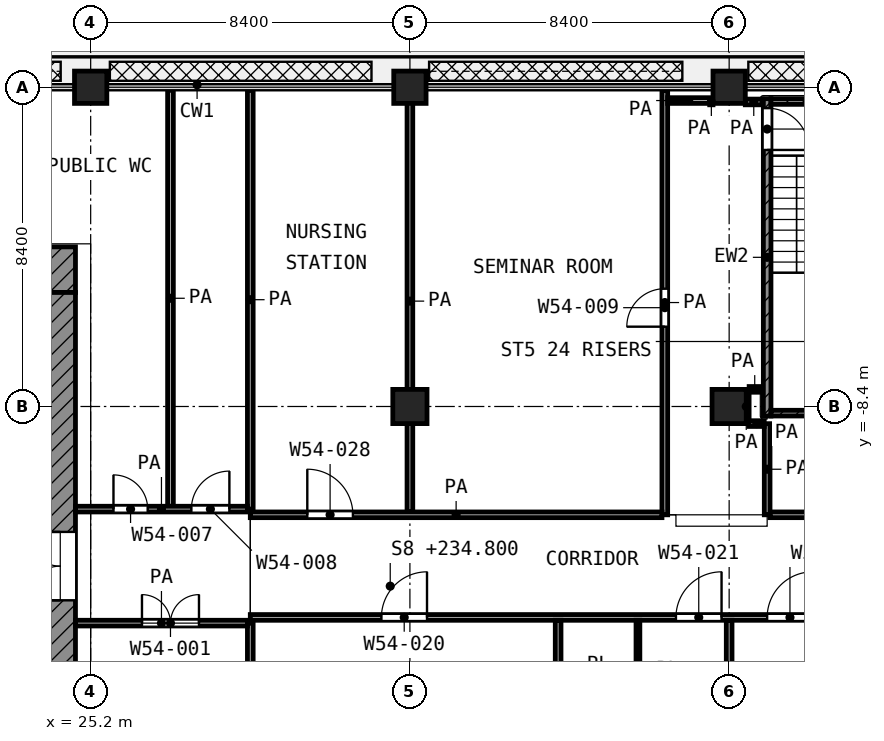
"""IFC4 building model, lengths in metres.
Left out: names, types, materials, properties, quantities, classifications, styles, units other than length and angle.
Written with IfcOpenShell. Run it as: python <this file> out.ifc"""

import sys

from ifc_helpers import new_model, si_unit, direction, frame, frame_2d, origin, origin_2d, place, context, subcontext, project, spatial, rectangle, extrude, element, fill, save


model = new_model("IFC4")
c1 = context("Model", 3, precision=1e-05, world=origin(), true_north=direction((0.0, 1.0)))
c2 = subcontext(c1, "Body", "Model", "MODEL_VIEW")
j1 = project(units=[si_unit("LENGTHUNIT", "METRE"), si_unit("PLANEANGLEUNIT", "RADIAN")], contexts=[c1])
p1 = place(None, origin())
s1 = spatial("IfcSite", under=j1, at=p1, CompositionType="ELEMENT")
p2 = place(p1, origin())
s2 = spatial("IfcBuilding", under=s1, at=p2, CompositionType="ELEMENT")
p3 = place(p2, frame((0.0, 0.0, 234.8)))
s3 = spatial("IfcBuildingStorey", under=s2, at=p3, CompositionType="ELEMENT", Elevation=234.8)
for number, where, z_axis, x_axis in (
    (1, (25.2, 0.0, 0.0), (0.0, 0.0, 1.0), (1.0, 0.0, 0.0)),
    (2, (33.6, 0.0, 0.0), (0.0, 0.0, 1.0), (1.0, 0.0, 0.0)),
    (3, (42.0, 0.0, 0.0), (0.0, 0.0, 1.0), (1.0, 0.0, 0.0)),
):
    element("IfcColumn", number, at=place(p3, frame(where, z_axis=z_axis, x_axis=x_axis)), inside=s3, PredefinedType="COLUMN", context=c2, shape_type="SweptSolid", body=[
        extrude(rectangle(XDim=0.85, YDim=0.85, at=origin_2d()), origin(), (0.0, 0.0, 1.0), 4.2),
    ])
for number, where, z_axis, x_axis in (
    (4, (33.6, -8.4, 0.0), (0.0, 0.0, 1.0), (1.0, 0.0, 0.0)),
    (5, (42.0, -8.4, 0.0), (0.0, 0.0, 1.0), (1.0, 0.0, 0.0)),
):
    element("IfcColumn", number, at=place(p3, frame(where, z_axis=z_axis, x_axis=x_axis)), inside=s3, PredefinedType="COLUMN", context=c2, shape_type="SweptSolid", body=[
        extrude(rectangle(XDim=0.9, YDim=0.9, at=origin_2d()), origin(), (0.0, 0.0, 1.0), 4.2),
    ])
p4 = place(p3, frame((4.2, -4.8, 0.0), z_axis=(0.0, 0.0, 1.0), x_axis=(1.0, 0.0, 0.0)))
e6 = element("IfcWall", 6, at=p4, inside=s3, PredefinedType="SHEAR", context=c2, shape_type="SweptSolid", body=[
    extrude(rectangle(XDim=20.6, YDim=1.2, at=frame_2d((10.3, 0.0))), origin(), (0.0, 0.0, 1.0), 3.6),
])
p5 = place(p4, frame((1.95, 0.0, 0.0)))
e7 = element("IfcOpeningElement", 7, at=p5, cuts=e6, PredefinedType="OPENING", context=c2, shape_type="SweptSolid", body=[
    extrude(rectangle(XDim=1.1, YDim=2.1, at=frame_2d((0.55, 1.05))), frame((0.0, 0.61, 0.0), z_axis=(0.0, -1.0, 0.0), x_axis=(1.0, 0.0, 0.0)), (0.0, 0.0, 1.0), 1.22),
])
p6 = place(p4, frame((17.95, 0.0, 0.0)))
e8 = element("IfcOpeningElement", 8, at=p6, cuts=e6, PredefinedType="OPENING", context=c2, shape_type="SweptSolid", body=[
    extrude(rectangle(XDim=1.1, YDim=2.1, at=frame_2d((0.55, 1.05))), frame((0.0, 0.61, 0.0), z_axis=(0.0, -1.0, 0.0), x_axis=(1.0, 0.0, 0.0)), (0.0, 0.0, 1.0), 1.22),
])
p7 = place(p3, frame((24.4, -24.0, 0.0), z_axis=(0.0, 0.0, 1.0), x_axis=(0.0, 1.0, 0.0)))
e9 = element("IfcWall", 9, at=p7, inside=s3, PredefinedType="SHEAR", context=c2, shape_type="SweptSolid", body=[
    extrude(rectangle(XDim=18.6, YDim=0.8, at=frame_2d((9.3, 0.0))), origin(), (0.0, 0.0, 1.0), 3.6),
])
p8 = place(p7, frame((10.5, 0.0, 0.0)))
e10 = element("IfcOpeningElement", 10, at=p8, cuts=e9, PredefinedType="OPENING", context=c2, shape_type="SweptSolid", body=[
    extrude(rectangle(XDim=1.8, YDim=2.1, at=frame_2d((0.9, 1.05))), frame((0.0, 0.41, 0.0), z_axis=(0.0, -1.0, 0.0), x_axis=(1.0, 0.0, 0.0)), (0.0, 0.0, 1.0), 0.82),
])
p9 = place(p3, frame((43.0, -8.65, 0.0), z_axis=(0.0, 0.0, 1.0), x_axis=(0.0, 1.0, 0.0)))
e11 = element("IfcWall", 11, at=p9, inside=s3, PredefinedType="SHEAR", context=c2, shape_type="SweptSolid", body=[
    extrude(rectangle(XDim=8.35, YDim=0.2, at=frame_2d((4.175, 0.0))), origin(), (0.0, 0.0, 1.0), 3.6),
])
p10 = place(p9, frame((7.0, 0.0, 0.0)))
e12 = element("IfcOpeningElement", 12, at=p10, cuts=e11, PredefinedType="OPENING", context=c2, shape_type="SweptSolid", body=[
    extrude(rectangle(XDim=1.1, YDim=2.1, at=frame_2d((0.55, 1.05))), frame((0.0, 0.11, 0.0), z_axis=(0.0, -1.0, 0.0), x_axis=(1.0, 0.0, 0.0)), (0.0, 0.0, 1.0), 0.22),
])
for number, where, z_axis, x_axis in (
    (13, (43.1, -0.375, 0.0), (0.0, 0.0, 1.0), (1.0, 0.0, 0.0)),
    (14, (43.1, -8.575, 0.0), (0.0, 0.0, 1.0), (1.0, 0.0, 0.0)),
):
    element("IfcWall", number, at=place(p3, frame(where, z_axis=z_axis, x_axis=x_axis)), inside=s3, PredefinedType="SHEAR", context=c2, shape_type="SweptSolid", body=[
        extrude(rectangle(XDim=2.85, YDim=0.15, at=frame_2d((1.425, 0.0))), origin(), (0.0, 0.0, 1.0), 3.6),
    ])
p11 = place(p3, frame((39.6, -16.65, 0.0), z_axis=(0.0, 0.0, 1.0), x_axis=(0.0, 1.0, 0.0)))
e15 = element("IfcWall", 15, at=p11, inside=s3, PredefinedType="PARTITIONING", context=c2, shape_type="SweptSolid", body=[
    extrude(rectangle(XDim=2.625, YDim=0.1, at=frame_2d((1.312, 0.0))), origin(), (0.0, 0.0, 1.0), 3.6),
])
p12 = place(p3, frame((24.8, -14.1, 0.0), z_axis=(0.0, 0.0, 1.0), x_axis=(1.0, 0.0, 0.0)))
e16 = element("IfcWall", 16, at=p12, inside=s3, PredefinedType="PARTITIONING", context=c2, shape_type="SweptSolid", body=[
    extrude(rectangle(XDim=4.525, YDim=0.15, at=frame_2d((2.262, 0.0))), origin(), (0.0, 0.0, 1.0), 3.6),
])
p13 = place(p12, frame((1.75, 0.0, 0.0)))
e17 = element("IfcOpeningElement", 17, at=p13, cuts=e16, PredefinedType="OPENING", context=c2, shape_type="SweptSolid", body=[
    extrude(rectangle(XDim=1.5, YDim=2.1, at=frame_2d((0.75, 1.05))), frame((0.0, 0.085, 0.0), z_axis=(0.0, -1.0, 0.0), x_axis=(1.0, 0.0, 0.0)), (0.0, 0.0, 1.0), 0.17),
])
p14 = place(p3, frame((29.4, -13.95, 0.0), z_axis=(0.0, 0.0, 1.0), x_axis=(1.0, 0.0, 0.0)))
e18 = element("IfcWall", 18, at=p14, inside=s3, PredefinedType="PARTITIONING", context=c2, shape_type="SweptSolid", body=[
    extrude(rectangle(XDim=33.52, YDim=0.15, at=frame_2d((16.76, 0.0))), origin(), (0.0, 0.0, 1.0), 2.7),
])
p15 = place(p14, frame((3.45, 0.0, 0.0)))
e19 = element("IfcOpeningElement", 19, at=p15, cuts=e18, PredefinedType="OPENING", context=c2, shape_type="SweptSolid", body=[
    extrude(rectangle(XDim=1.2, YDim=2.1, at=frame_2d((0.6, 1.05))), frame((0.0, 0.085, 0.0), z_axis=(0.0, -1.0, 0.0), x_axis=(1.0, 0.0, 0.0)), (0.0, 0.0, 1.0), 0.17),
])
p16 = place(p14, frame((11.2, 0.0, 0.0)))
e20 = element("IfcOpeningElement", 20, at=p16, cuts=e18, PredefinedType="OPENING", context=c2, shape_type="SweptSolid", body=[
    extrude(rectangle(XDim=1.2, YDim=2.1, at=frame_2d((0.6, 1.05))), frame((0.0, 0.085, 0.0), z_axis=(0.0, -1.0, 0.0), x_axis=(1.0, 0.0, 0.0)), (0.0, 0.0, 1.0), 0.17),
])
p17 = place(p14, frame((13.6, 0.0, 0.0)))
e21 = element("IfcOpeningElement", 21, at=p17, cuts=e18, PredefinedType="OPENING", context=c2, shape_type="SweptSolid", body=[
    extrude(rectangle(XDim=1.2, YDim=2.1, at=frame_2d((0.6, 1.05))), frame((0.0, 0.085, 0.0), z_axis=(0.0, -1.0, 0.0), x_axis=(1.0, 0.0, 0.0)), (0.0, 0.0, 1.0), 0.17),
])
p18 = place(p14, frame((21.075, 0.0, 0.0)))
e22 = element("IfcOpeningElement", 22, at=p18, cuts=e18, PredefinedType="OPENING", context=c2, shape_type="SweptSolid", body=[
    extrude(rectangle(XDim=1.2, YDim=2.1, at=frame_2d((0.6, 1.05))), frame((0.0, 0.085, 0.0), z_axis=(0.0, -1.0, 0.0), x_axis=(1.0, 0.0, 0.0)), (0.0, 0.0, 1.0), 0.17),
])
p19 = place(p14, frame((19.55, 0.0, 0.0)))
e23 = element("IfcOpeningElement", 23, at=p19, cuts=e18, PredefinedType="OPENING", context=c2, shape_type="SweptSolid", body=[
    extrude(rectangle(XDim=1.2, YDim=2.1, at=frame_2d((0.6, 1.05))), frame((0.0, 0.085, 0.0), z_axis=(0.0, -1.0, 0.0), x_axis=(1.0, 0.0, 0.0)), (0.0, 0.0, 1.0), 0.17),
])
p20 = place(p14, frame((22.95, 0.0, 0.0)))
e24 = element("IfcOpeningElement", 24, at=p20, cuts=e18, PredefinedType="OPENING", context=c2, shape_type="SweptSolid", body=[
    extrude(rectangle(XDim=1.2, YDim=2.1, at=frame_2d((0.6, 1.05))), frame((0.0, 0.085, 0.0), z_axis=(0.0, -1.0, 0.0), x_axis=(1.0, 0.0, 0.0)), (0.0, 0.0, 1.0), 0.17),
])
p21 = place(p14, frame((28.35, 0.0, 0.0)))
e25 = element("IfcOpeningElement", 25, at=p21, cuts=e18, PredefinedType="OPENING", context=c2, shape_type="SweptSolid", body=[
    extrude(rectangle(XDim=1.5, YDim=2.1, at=frame_2d((0.75, 1.05))), frame((0.0, 0.085, 0.0), z_axis=(0.0, -1.0, 0.0), x_axis=(1.0, 0.0, 0.0)), (0.0, 0.0, 1.0), 0.17),
])
p22 = place(p3, frame((29.4, -11.25, 0.0), z_axis=(0.0, 0.0, 1.0), x_axis=(1.0, 0.0, 0.0)))
e26 = element("IfcWall", 26, at=p22, inside=s3, PredefinedType="PARTITIONING", context=c2, shape_type="SweptSolid", body=[
    extrude(rectangle(XDim=10.832, YDim=0.15, at=frame_2d((5.416, 0.0))), origin(), (0.0, 0.0, 1.0), 3.6),
])
p23 = place(p22, frame((1.5, 0.0, 0.0)))
e27 = element("IfcOpeningElement", 27, at=p23, cuts=e26, PredefinedType="OPENING", context=c2, shape_type="SweptSolid", body=[
    extrude(rectangle(XDim=1.2, YDim=2.1, at=frame_2d((0.6, 1.05))), frame((0.0, 0.085, 0.0), z_axis=(0.0, -1.0, 0.0), x_axis=(1.0, 0.0, 0.0)), (0.0, 0.0, 1.0), 0.17),
])
p24 = place(p3, frame((43.075, -11.25, 0.0), z_axis=(0.0, 0.0, 1.0), x_axis=(1.0, 0.0, 0.0)))
e28 = element("IfcWall", 28, at=p24, inside=s3, PredefinedType="PARTITIONING", context=c2, shape_type="SweptSolid", body=[
    extrude(rectangle(XDim=5.375, YDim=0.15, at=frame_2d((2.688, 0.0))), origin(), (0.0, 0.0, 1.0), 3.6),
])
p25 = place(p24, frame((2.188, 0.0, 0.0)))
e29 = element("IfcOpeningElement", 29, at=p25, cuts=e28, PredefinedType="OPENING", context=c2, shape_type="SweptSolid", body=[
    extrude(rectangle(XDim=1.0, YDim=2.1, at=frame_2d((0.5, 1.05))), frame((0.0, 0.085, 0.0), z_axis=(0.0, -1.0, 0.0), x_axis=(1.0, 0.0, 0.0)), (0.0, 0.0, 1.0), 0.17),
])
p26 = place(p3, frame((24.8, -11.1, 0.0), z_axis=(0.0, 0.0, 1.0), x_axis=(1.0, 0.0, 0.0)))
e30 = element("IfcWall", 30, at=p26, inside=s3, PredefinedType="PARTITIONING", context=c2, shape_type="SweptSolid", body=[
    extrude(rectangle(XDim=4.525, YDim=0.15, at=frame_2d((2.262, 0.0))), origin(), (0.0, 0.0, 1.0), 3.6),
])
p27 = place(p26, frame((1.0, 0.0, 0.0)))
e31 = element("IfcOpeningElement", 31, at=p27, cuts=e30, PredefinedType="OPENING", context=c2, shape_type="SweptSolid", body=[
    extrude(rectangle(XDim=0.9, YDim=2.1, at=frame_2d((0.45, 1.05))), frame((0.0, 0.085, 0.0), z_axis=(0.0, -1.0, 0.0), x_axis=(1.0, 0.0, 0.0)), (0.0, 0.0, 1.0), 0.17),
])
p28 = place(p26, frame((3.05, 0.0, 0.0)))
e32 = element("IfcOpeningElement", 32, at=p28, cuts=e30, PredefinedType="OPENING", context=c2, shape_type="SweptSolid", body=[
    extrude(rectangle(XDim=1.0, YDim=2.1, at=frame_2d((0.5, 1.05))), frame((0.0, 0.085, 0.0), z_axis=(0.0, -1.0, 0.0), x_axis=(1.0, 0.0, 0.0)), (0.0, 0.0, 1.0), 0.17),
])
p29 = place(p3, frame((42.525, -8.85, 0.0), z_axis=(0.0, 0.0, 1.0), x_axis=(1.0, 0.0, 0.0)))
e33 = element("IfcWall", 33, at=p29, inside=s3, PredefinedType="PARTITIONING", context=c2, shape_type="SweptSolid", body=[
    extrude(rectangle(XDim=0.398, YDim=0.15, at=frame_2d((0.199, 0.0))), origin(), (0.0, 0.0, 1.0), 3.6),
])
p30 = place(p3, frame((42.526, -7.95, 0.0), z_axis=(0.0, 0.0, 1.0), x_axis=(1.0, 0.0, 0.0)))
e34 = element("IfcWall", 34, at=p30, inside=s3, PredefinedType="PARTITIONING", context=c2, shape_type="SweptSolid", body=[
    extrude(rectangle(XDim=0.294, YDim=0.15, at=frame_2d((0.147, 0.0))), origin(), (0.0, 0.0, 1.0), 3.6),
])
p31 = place(p3, frame((41.488, -0.387, 0.0), z_axis=(0.0, 0.0, 1.0), x_axis=(1.0, 0.0, 0.0)))
e35 = element("IfcWall", 35, at=p31, inside=s3, PredefinedType="PARTITIONING", context=c2, shape_type="SweptSolid", body=[
    extrude(rectangle(XDim=0.087, YDim=0.15, at=frame_2d((0.043, 0.0))), origin(), (0.0, 0.0, 1.0), 3.6),
])
p32 = place(p3, frame((42.425, -0.387, 0.0), z_axis=(0.0, 0.0, 1.0), x_axis=(1.0, 0.0, 0.0)))
e36 = element("IfcWall", 36, at=p32, inside=s3, PredefinedType="PARTITIONING", context=c2, shape_type="SweptSolid", body=[
    extrude(rectangle(XDim=0.445, YDim=0.15, at=frame_2d((0.223, 0.0))), origin(), (0.0, 0.0, 1.0), 3.6),
])
p33 = place(p3, frame((40.382, -0.35, 0.0), z_axis=(0.0, 0.0, 1.0), x_axis=(1.0, 0.0, 0.0)))
e37 = element("IfcWall", 37, at=p33, inside=s3, PredefinedType="PARTITIONING", context=c2, shape_type="SweptSolid", body=[
    extrude(rectangle(XDim=1.106, YDim=0.15, at=frame_2d((0.553, 0.0))), origin(), (0.0, 0.0, 1.0), 3.6),
])
p34 = place(p3, frame((27.3, -11.025, 0.0), z_axis=(0.0, 0.0, 1.0), x_axis=(0.0, 1.0, 0.0)))
e38 = element("IfcWall", 38, at=p34, inside=s3, PredefinedType="PARTITIONING", context=c2, shape_type="SweptSolid", body=[
    extrude(rectangle(XDim=10.945, YDim=0.15, at=frame_2d((5.472, 0.0))), origin(), (0.0, 0.0, 1.0), 3.6),
])
p35 = place(p3, frame((29.4, -25.2, 0.0), z_axis=(0.0, 0.0, 1.0), x_axis=(0.0, 1.0, 0.0)))
e39 = element("IfcWall", 39, at=p35, inside=s3, PredefinedType="PARTITIONING", context=c2, shape_type="SweptSolid", body=[
    extrude(rectangle(XDim=11.1, YDim=0.15, at=frame_2d((5.55, 0.0))), origin(), (0.0, 0.0, 1.0), 3.6),
])
p36 = place(p3, frame((29.4, -11.1, 0.0), z_axis=(0.0, 0.0, 1.0), x_axis=(0.0, 1.0, 0.0)))
e40 = element("IfcWall", 40, at=p36, inside=s3, PredefinedType="PARTITIONING", context=c2, shape_type="SweptSolid", body=[
    extrude(rectangle(XDim=11.02, YDim=0.15, at=frame_2d((5.51, 0.0))), origin(), (0.0, 0.0, 1.0), 3.6),
])
p37 = place(p3, frame((33.6, -11.175, 0.0), z_axis=(0.0, 0.0, 1.0), x_axis=(0.0, 1.0, 0.0)))
e41 = element("IfcWall", 41, at=p37, inside=s3, PredefinedType="PARTITIONING", context=c2, shape_type="SweptSolid", body=[
    extrude(rectangle(XDim=11.095, YDim=0.15, at=frame_2d((5.547, 0.0))), origin(), (0.0, 0.0, 1.0), 3.6),
])
p38 = place(p3, frame((37.5, -25.12, 0.0), z_axis=(0.0, 0.0, 1.0), x_axis=(0.0, 1.0, 0.0)))
e42 = element("IfcWall", 42, at=p38, inside=s3, PredefinedType="PARTITIONING", context=c2, shape_type="SweptSolid", body=[
    extrude(rectangle(XDim=11.095, YDim=0.15, at=frame_2d((5.548, 0.0))), origin(), (0.0, 0.0, 1.0), 3.6),
])
p39 = place(p3, frame((40.307, -11.25, 0.0), z_axis=(0.0, 0.0, 1.0), x_axis=(0.0, 1.0, 0.0)))
e43 = element("IfcWall", 43, at=p39, inside=s3, PredefinedType="PARTITIONING", context=c2, shape_type="SweptSolid", body=[
    extrude(rectangle(XDim=11.17, YDim=0.15, at=frame_2d((5.585, 0.0))), origin(), (0.0, 0.0, 1.0), 3.6),
])
p40 = place(p39, frame((4.95, 0.0, 0.0)))
e44 = element("IfcOpeningElement", 44, at=p40, cuts=e43, PredefinedType="OPENING", context=c2, shape_type="SweptSolid", body=[
    extrude(rectangle(XDim=1.0, YDim=2.1, at=frame_2d((0.5, 1.05))), frame((0.0, 0.085, 0.0), z_axis=(0.0, -1.0, 0.0), x_axis=(1.0, 0.0, 0.0)), (0.0, 0.0, 1.0), 0.17),
])
p41 = place(p3, frame((42.0, -25.12, 0.0), z_axis=(0.0, 0.0, 1.0), x_axis=(0.0, 1.0, 0.0)))
e45 = element("IfcWall", 45, at=p41, inside=s3, PredefinedType="PARTITIONING", context=c2, shape_type="SweptSolid", body=[
    extrude(rectangle(XDim=11.095, YDim=0.15, at=frame_2d((5.548, 0.0))), origin(), (0.0, 0.0, 1.0), 3.6),
])
p42 = place(p3, frame((42.45, -8.85, 0.0), z_axis=(0.0, 0.0, 1.0), x_axis=(0.0, 1.0, 0.0)))
e46 = element("IfcWall", 46, at=p42, inside=s3, PredefinedType="PARTITIONING", context=c2, shape_type="SweptSolid", body=[
    extrude(rectangle(XDim=0.899, YDim=0.15, at=frame_2d((0.45, 0.0))), origin(), (0.0, 0.0, 1.0), 3.6),
])
p43 = place(p3, frame((43.0, -11.25, 0.0), z_axis=(0.0, 0.0, 1.0), x_axis=(0.0, 1.0, 0.0)))
e47 = element("IfcWall", 47, at=p43, inside=s3, PredefinedType="PARTITIONING", context=c2, shape_type="SweptSolid", body=[
    extrude(rectangle(XDim=2.398, YDim=0.15, at=frame_2d((1.199, 0.0))), origin(), (0.0, 0.0, 1.0), 3.6),
])
p44 = place(p8, origin())
e48 = element("IfcDoor", 48, at=p44, inside=s3, OperationType="DOUBLE_DOOR_SINGLE_SWING", PredefinedType="DOOR", context=c2, shape_type="SweptSolid", body=[
    extrude(rectangle(XDim=1.8, YDim=2.1, at=frame_2d((0.9, 1.05))), frame((0.0, 0.025, 0.0), z_axis=(0.0, -1.0, 0.0), x_axis=(1.0, 0.0, 0.0)), (0.0, 0.0, 1.0), 0.05),
])
fill(e10, e48)
p45 = place(p10, frame((1.1, 0.0, 0.0), z_axis=(0.0, 0.0, 1.0), x_axis=(-1.0, 0.0, 0.0)))
e49 = element("IfcDoor", 49, at=p45, inside=s3, OperationType="SINGLE_SWING_LEFT", PredefinedType="DOOR", context=c2, shape_type="SweptSolid", body=[
    extrude(rectangle(XDim=1.1, YDim=2.1, at=frame_2d((0.55, 1.05))), frame((0.0, 0.025, 0.0), z_axis=(0.0, -1.0, 0.0), x_axis=(1.0, 0.0, 0.0)), (0.0, 0.0, 1.0), 0.05),
])
fill(e12, e49)
p46 = place(p13, origin())
e50 = element("IfcDoor", 50, at=p46, inside=s3, OperationType="DOUBLE_DOOR_SINGLE_SWING", PredefinedType="DOOR", context=c2, shape_type="SweptSolid", body=[
    extrude(rectangle(XDim=1.5, YDim=2.1, at=frame_2d((0.75, 1.05))), frame((0.0, 0.025, 0.0), z_axis=(0.0, -1.0, 0.0), x_axis=(1.0, 0.0, 0.0)), (0.0, 0.0, 1.0), 0.05),
])
fill(e17, e50)
p47 = place(p40, origin())
e51 = element("IfcDoor", 51, at=p47, inside=s3, OperationType="SINGLE_SWING_LEFT", PredefinedType="DOOR", context=c2, shape_type="SweptSolid", body=[
    extrude(rectangle(XDim=1.0, YDim=2.1, at=frame_2d((0.5, 1.05))), frame((0.0, 0.025, 0.0), z_axis=(0.0, -1.0, 0.0), x_axis=(1.0, 0.0, 0.0)), (0.0, 0.0, 1.0), 0.05),
])
fill(e44, e51)
p48 = place(p15, origin())
e52 = element("IfcDoor", 52, at=p48, inside=s3, OperationType="SINGLE_SWING_RIGHT", PredefinedType="DOOR", context=c2, shape_type="SweptSolid", body=[
    extrude(rectangle(XDim=1.2, YDim=2.1, at=frame_2d((0.6, 1.05))), frame((0.0, 0.025, 0.0), z_axis=(0.0, -1.0, 0.0), x_axis=(1.0, 0.0, 0.0)), (0.0, 0.0, 1.0), 0.05),
])
fill(e19, e52)
p49 = place(p16, origin())
e53 = element("IfcDoor", 53, at=p49, inside=s3, OperationType="SINGLE_SWING_RIGHT", PredefinedType="DOOR", context=c2, shape_type="SweptSolid", body=[
    extrude(rectangle(XDim=1.2, YDim=2.1, at=frame_2d((0.6, 1.05))), frame((0.0, 0.025, 0.0), z_axis=(0.0, -1.0, 0.0), x_axis=(1.0, 0.0, 0.0)), (0.0, 0.0, 1.0), 0.05),
])
fill(e20, e53)
p50 = place(p17, origin())
e54 = element("IfcDoor", 54, at=p50, inside=s3, OperationType="SINGLE_SWING_RIGHT", PredefinedType="DOOR", context=c2, shape_type="SweptSolid", body=[
    extrude(rectangle(XDim=1.2, YDim=2.1, at=frame_2d((0.6, 1.05))), frame((0.0, 0.025, 0.0), z_axis=(0.0, -1.0, 0.0), x_axis=(1.0, 0.0, 0.0)), (0.0, 0.0, 1.0), 0.05),
])
fill(e21, e54)
p51 = place(p27, origin())
e55 = element("IfcDoor", 55, at=p51, inside=s3, OperationType="SINGLE_SWING_LEFT", PredefinedType="DOOR", context=c2, shape_type="SweptSolid", body=[
    extrude(rectangle(XDim=0.9, YDim=2.1, at=frame_2d((0.45, 1.05))), frame((0.0, 0.025, 0.0), z_axis=(0.0, -1.0, 0.0), x_axis=(1.0, 0.0, 0.0)), (0.0, 0.0, 1.0), 0.05),
])
fill(e31, e55)
p52 = place(p28, origin())
e56 = element("IfcDoor", 56, at=p52, inside=s3, OperationType="SINGLE_SWING_RIGHT", PredefinedType="DOOR", context=c2, shape_type="SweptSolid", body=[
    extrude(rectangle(XDim=1.0, YDim=2.1, at=frame_2d((0.5, 1.05))), frame((0.0, 0.025, 0.0), z_axis=(0.0, -1.0, 0.0), x_axis=(1.0, 0.0, 0.0)), (0.0, 0.0, 1.0), 0.05),
])
fill(e32, e56)
p53 = place(p23, origin())
e57 = element("IfcDoor", 57, at=p53, inside=s3, OperationType="SINGLE_SWING_LEFT", PredefinedType="DOOR", context=c2, shape_type="SweptSolid", body=[
    extrude(rectangle(XDim=1.2, YDim=2.1, at=frame_2d((0.6, 1.05))), frame((0.0, 0.025, 0.0), z_axis=(0.0, -1.0, 0.0), x_axis=(1.0, 0.0, 0.0)), (0.0, 0.0, 1.0), 0.05),
])
fill(e27, e57)
save(model, sys.argv[1])
